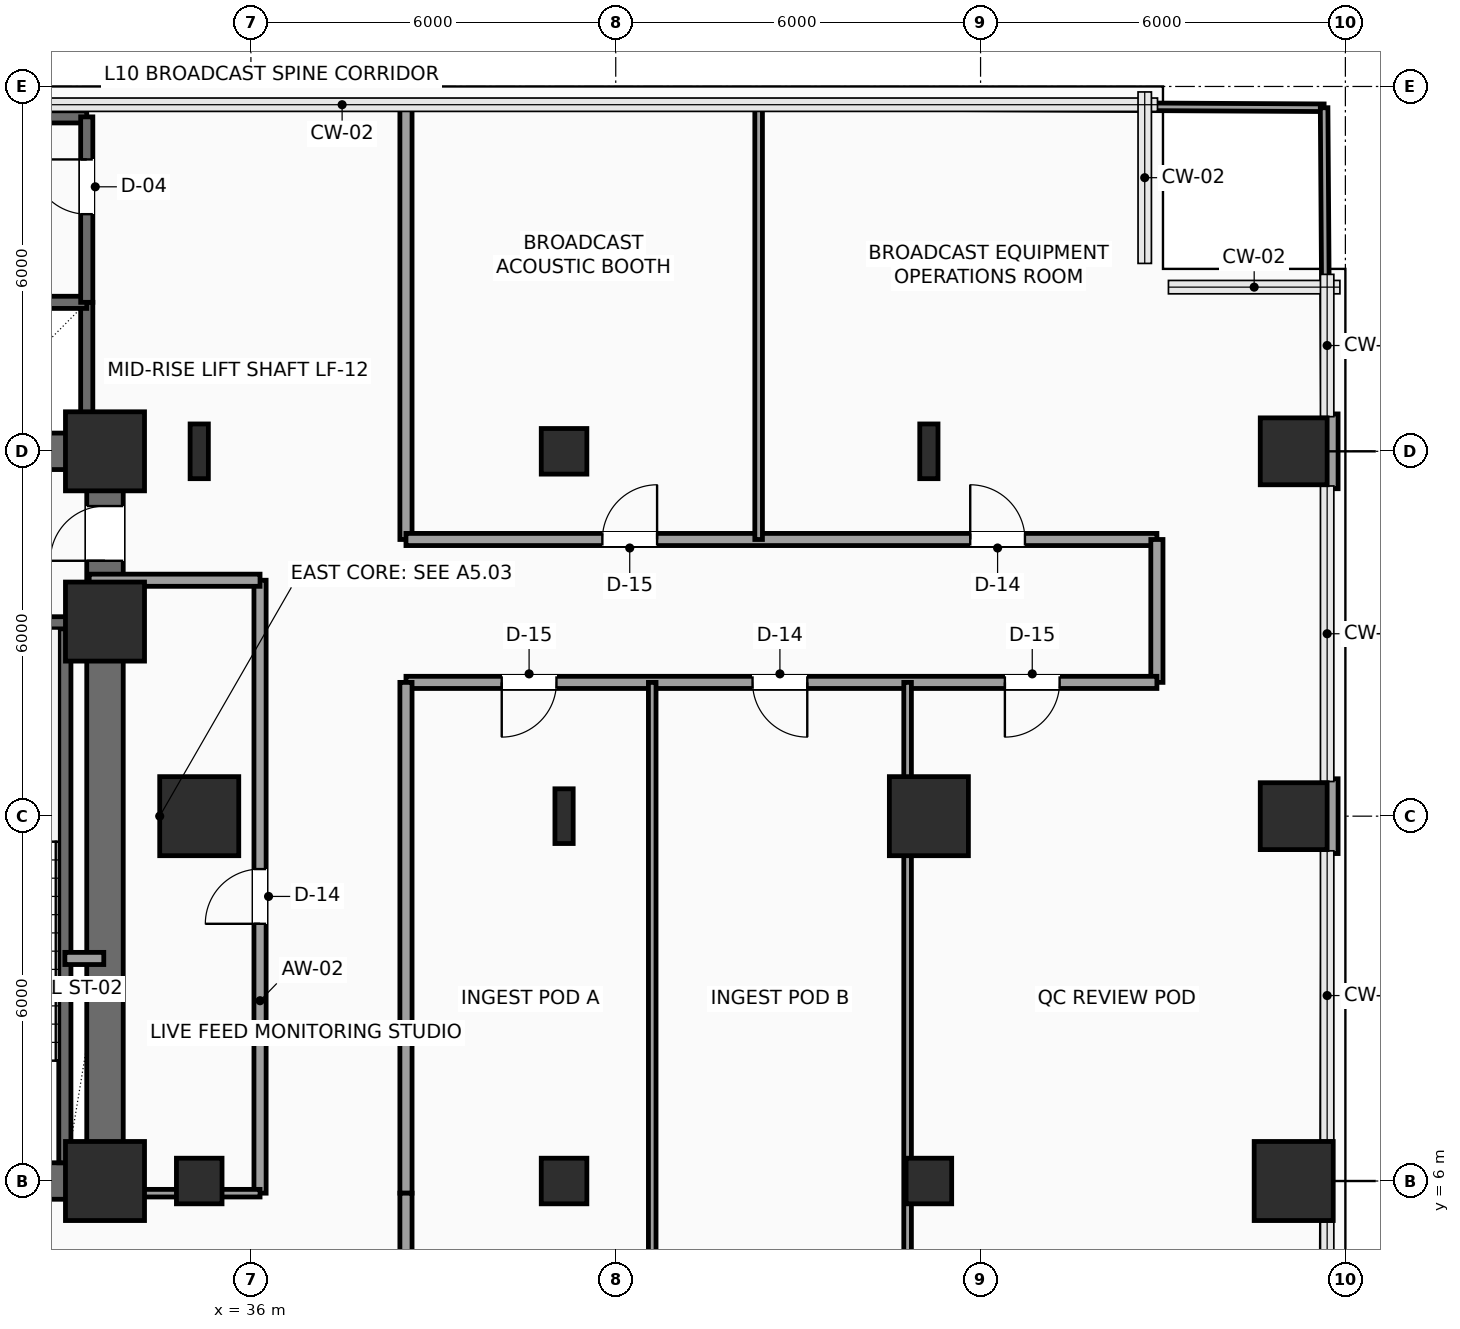
"""IFC4 building model, lengths in metres.
Left out: names, types, materials, properties, quantities, classifications, styles, units other than length and angle.
Written with IfcOpenShell. Run it as: python <this file> out.ifc"""

import sys

from ifc_helpers import new_model, si_unit, direction, frame, frame_2d, origin, origin_2d, place, context, subcontext, project, spatial, rectangle, hollow_rectangle, i_section, extrude, element, fill, save


model = new_model("IFC4")
c1 = context("Model", 3, precision=1e-05, world=origin(), true_north=direction((0.0, 1.0)))
c2 = subcontext(c1, "Body", "Model", "MODEL_VIEW")
j1 = project(units=[si_unit("LENGTHUNIT", "METRE"), si_unit("PLANEANGLEUNIT", "RADIAN")], contexts=[c1])
p1 = place(None, origin())
s1 = spatial("IfcSite", under=j1, at=p1, CompositionType="ELEMENT")
p2 = place(p1, origin())
s2 = spatial("IfcBuilding", under=s1, at=p2, CompositionType="ELEMENT")
p3 = place(p2, frame((0.0, 0.0, 48.0)))
s3 = spatial("IfcBuildingStorey", under=s2, at=p3, CompositionType="ELEMENT", Elevation=48.0)
for number, where, z_axis, x_axis in (
    (1, (33.6, 6.0, 0.0), (0.0, 0.0, 1.0), (1.0, 0.0, 0.0)),
    (2, (33.6, 15.2, 0.0), (0.0, 0.0, 1.0), (1.0, 0.0, 0.0)),
    (3, (33.6, 18.0, 0.0), (0.0, 0.0, 1.0), (1.0, 0.0, 0.0)),
):
    element("IfcColumn", number, at=place(p3, frame(where, z_axis=z_axis, x_axis=x_axis)), inside=s3, PredefinedType="COLUMN", context=c2, shape_type="SweptSolid", body=[
        extrude(rectangle(XDim=1.3, YDim=1.3, at=origin_2d()), origin(), (0.0, 0.0, 1.0), 3.9),
    ])
p4 = place(p3, frame((35.15, 6.0, 0.0), z_axis=(0.0, 0.0, 1.0), x_axis=(1.0, 0.0, 0.0)))
e4 = element("IfcColumn", 4, at=p4, inside=s3, PredefinedType="COLUMN", context=c2, shape_type="SweptSolid", body=[
    extrude(hollow_rectangle(XDim=0.75, YDim=0.75, WallThickness=0.035, InnerFilletRadius=0.035, OuterFilletRadius=0.05, at=origin_2d()), origin(), (0.0, 0.0, 1.0), 3.9),
])
p5 = place(p3, frame((35.15, 12.0, 0.0), z_axis=(0.0, 0.0, 1.0), x_axis=(1.0, 0.0, 0.0)))
e5 = element("IfcColumn", 5, at=p5, inside=s3, PredefinedType="COLUMN", context=c2, shape_type="SweptSolid", body=[
    extrude(rectangle(XDim=1.3, YDim=1.3, at=origin_2d()), origin(), (0.0, 0.0, 1.0), 3.9),
])
p6 = place(p3, frame((35.15, 18.0, 0.0), z_axis=(0.0, 0.0, 1.0), x_axis=(1.0, 0.0, 0.0)))
e6 = element("IfcColumn", 6, at=p6, inside=s3, PredefinedType="COLUMN", context=c2, shape_type="SweptSolid", body=[
    extrude(i_section(OverallWidth=0.3, OverallDepth=0.9, WebThickness=0.019, FlangeThickness=0.035, FilletRadius=0.03, at=origin_2d()), origin(), (0.0, 0.0, 1.0), 3.9),
])
p7 = place(p3, frame((41.15, 6.0, 0.0), z_axis=(0.0, 0.0, 1.0), x_axis=(1.0, 0.0, 0.0)))
e7 = element("IfcColumn", 7, at=p7, inside=s3, PredefinedType="COLUMN", context=c2, shape_type="SweptSolid", body=[
    extrude(hollow_rectangle(XDim=0.75, YDim=0.75, WallThickness=0.035, InnerFilletRadius=0.035, OuterFilletRadius=0.05, at=origin_2d()), origin(), (0.0, 0.0, 1.0), 3.9),
])
p8 = place(p3, frame((41.15, 12.0, 0.0), z_axis=(0.0, 0.0, 1.0), x_axis=(1.0, 0.0, 0.0)))
e8 = element("IfcColumn", 8, at=p8, inside=s3, PredefinedType="COLUMN", context=c2, shape_type="SweptSolid", body=[
    extrude(i_section(OverallWidth=0.3, OverallDepth=0.9, WebThickness=0.019, FlangeThickness=0.035, FilletRadius=0.03, at=origin_2d()), origin(), (0.0, 0.0, 1.0), 3.9),
])
for number, where, z_axis, x_axis in (
    (9, (41.15, 18.0, 0.0), (0.0, 0.0, 1.0), (1.0, 0.0, 0.0)),
    (10, (47.15, 6.0, 0.0), (0.0, 0.0, 1.0), (1.0, 0.0, 0.0)),
):
    element("IfcColumn", number, at=place(p3, frame(where, z_axis=z_axis, x_axis=x_axis)), inside=s3, PredefinedType="COLUMN", context=c2, shape_type="SweptSolid", body=[
        extrude(hollow_rectangle(XDim=0.75, YDim=0.75, WallThickness=0.035, InnerFilletRadius=0.035, OuterFilletRadius=0.05, at=origin_2d()), origin(), (0.0, 0.0, 1.0), 3.9),
    ])
p9 = place(p3, frame((47.15, 12.0, 0.0), z_axis=(0.0, 0.0, 1.0), x_axis=(1.0, 0.0, 0.0)))
e11 = element("IfcColumn", 11, at=p9, inside=s3, PredefinedType="COLUMN", context=c2, shape_type="SweptSolid", body=[
    extrude(rectangle(XDim=1.3, YDim=1.3, at=origin_2d()), origin(), (0.0, 0.0, 1.0), 3.9),
])
p10 = place(p3, frame((47.15, 18.0, 0.0), z_axis=(0.0, 0.0, 1.0), x_axis=(1.0, 0.0, 0.0)))
e12 = element("IfcColumn", 12, at=p10, inside=s3, PredefinedType="COLUMN", context=c2, shape_type="SweptSolid", body=[
    extrude(i_section(OverallWidth=0.3, OverallDepth=0.9, WebThickness=0.019, FlangeThickness=0.035, FilletRadius=0.03, at=origin_2d()), origin(), (0.0, 0.0, 1.0), 3.9),
])
p11 = place(p3, frame((53.15, 6.0, 0.0), z_axis=(0.0, 0.0, 1.0), x_axis=(1.0, 0.0, 0.0)))
e13 = element("IfcColumn", 13, at=p11, inside=s3, PredefinedType="COLUMN", context=c2, shape_type="SweptSolid", body=[
    extrude(rectangle(XDim=1.3, YDim=1.3, at=origin_2d()), origin(), (0.0, 0.0, 1.0), 3.9),
])
for number, where, z_axis, x_axis in (
    (14, (53.15, 12.0, 0.0), (0.0, 0.0, 1.0), (1.0, 0.0, 0.0)),
    (15, (53.15, 18.0, 0.0), (0.0, 0.0, 1.0), (1.0, 0.0, 0.0)),
):
    element("IfcColumn", number, at=place(p3, frame(where, z_axis=z_axis, x_axis=x_axis)), inside=s3, PredefinedType="COLUMN", context=c2, shape_type="SweptSolid", body=[
        extrude(rectangle(XDim=1.1, YDim=1.1, at=origin_2d()), origin(), (0.0, 0.0, 1.0), 3.9),
    ])
for number, where, z_axis, x_axis in (
    (16, (53.76, 18.615, 0.0), (0.0, 0.0, 1.0), (0.0, -1.0, 0.0)),
    (17, (53.76, 12.615, 0.0), (0.0, 0.0, 1.0), (0.0, -1.0, 0.0)),
):
    element("IfcWall", number, at=place(p3, frame(where, z_axis=z_axis, x_axis=x_axis)), inside=s3, PredefinedType="SOLIDWALL", context=c2, shape_type="SweptSolid", body=[
        extrude(rectangle(XDim=1.23, YDim=0.24, at=frame_2d((0.615, 0.0))), origin(), (0.0, 0.0, 1.0), 3.65),
    ])
for number, where, z_axis, x_axis in (
    (18, (24.0, 6.0, 0.0), (0.0, 0.0, 1.0), (1.0, 0.0, 0.0)),
    (19, (24.0, 18.0, 0.0), (0.0, 0.0, 1.0), (1.0, 0.0, 0.0)),
):
    element("IfcWall", number, at=place(p3, frame(where, z_axis=z_axis, x_axis=x_axis)), inside=s3, PredefinedType="SHEAR", context=c2, shape_type="SweptSolid", body=[
        extrude(rectangle(XDim=9.6, YDim=0.6, at=frame_2d((4.8, 0.0))), origin(), (0.0, 0.0, 1.0), 3.65),
    ])
p12 = place(p3, frame((33.6, 6.0, 0.0), z_axis=(0.0, 0.0, 1.0), x_axis=(0.0, 1.0, 0.0)))
e20 = element("IfcWall", 20, at=p12, inside=s3, PredefinedType="SHEAR", context=c2, shape_type="SweptSolid", body=[
    extrude(rectangle(XDim=12.0, YDim=0.6, at=frame_2d((6.0, 0.0))), origin(), (0.0, 0.0, 1.0), 3.65),
])
p13 = place(p12, frame((10.2, 0.0, 0.0)))
e21 = element("IfcOpeningElement", 21, at=p13, cuts=e20, PredefinedType="OPENING", context=c2, shape_type="SweptSolid", body=[
    extrude(rectangle(XDim=0.9, YDim=2.15, at=frame_2d((0.45, 1.075))), frame((0.0, 0.31, 0.0), z_axis=(0.0, -1.0, 0.0), x_axis=(1.0, 0.0, 0.0)), (0.0, 0.0, 1.0), 0.62),
])
p14 = place(p3, frame((32.94, 6.3, 0.0), z_axis=(0.0, 0.0, 1.0), x_axis=(0.0, 1.0, 0.0)))
e22 = element("IfcWall", 22, at=p14, inside=s3, PredefinedType="SHEAR", context=c2, shape_type="SweptSolid", body=[
    extrude(rectangle(XDim=8.88, YDim=0.2, at=frame_2d((4.44, 0.0))), origin(), (0.0, 0.0, 1.0), 3.65),
])
p15 = place(p3, frame((29.26, 15.18, 0.0), z_axis=(0.0, 0.0, 1.0), x_axis=(1.0, 0.0, 0.0)))
e23 = element("IfcWall", 23, at=p15, inside=s3, PredefinedType="SHEAR", context=c2, shape_type="SweptSolid", body=[
    extrude(rectangle(XDim=4.04, YDim=0.2, at=frame_2d((2.02, 0.0))), origin(), (0.0, 0.0, 1.0), 3.65),
])
p16 = place(p3, frame((32.94, 9.66, 0.0), z_axis=(0.0, 0.0, 1.0), x_axis=(1.0, 0.0, 0.0)))
e24 = element("IfcWall", 24, at=p16, inside=s3, PredefinedType="SOLIDWALL", context=c2, shape_type="SweptSolid", body=[
    extrude(rectangle(XDim=0.64, YDim=0.2, at=frame_2d((0.32, 0.0))), origin(), (0.0, 0.0, 1.0), 3.65),
])
p17 = place(p3, frame((33.3, 18.1, 0.0), z_axis=(0.0, 0.0, 1.0), x_axis=(0.0, 1.0, 0.0)))
e25 = element("IfcWall", 25, at=p17, inside=s3, PredefinedType="SHEAR", context=c2, shape_type="SweptSolid", body=[
    extrude(rectangle(XDim=2.35, YDim=0.2, at=frame_2d((1.175, 0.0))), origin(), (0.0, 0.0, 1.0), 3.65),
])
p18 = place(p3, frame((24.25, 20.45, 0.0), z_axis=(0.0, 0.0, 1.0), x_axis=(1.0, 0.0, 0.0)))
e26 = element("IfcWall", 26, at=p18, inside=s3, PredefinedType="SHEAR", context=c2, shape_type="SweptSolid", body=[
    extrude(rectangle(XDim=9.05, YDim=0.2, at=frame_2d((4.525, 0.0))), origin(), (0.0, 0.0, 1.0), 3.65),
])
p19 = place(p3, frame((24.15, 23.5, 0.0), z_axis=(0.0, 0.0, 1.0), x_axis=(1.0, 0.0, 0.0)))
e27 = element("IfcWall", 27, at=p19, inside=s3, PredefinedType="SHEAR", context=c2, shape_type="SweptSolid", body=[
    extrude(rectangle(XDim=9.15, YDim=0.2, at=frame_2d((4.575, 0.0))), origin(), (0.0, 0.0, 1.0), 3.65),
])
p20 = place(p3, frame((33.3, 20.45, 0.0), z_axis=(0.0, 0.0, 1.0), x_axis=(0.0, 1.0, 0.0)))
e28 = element("IfcWall", 28, at=p20, inside=s3, PredefinedType="SHEAR", context=c2, shape_type="SweptSolid", body=[
    extrude(rectangle(XDim=3.05, YDim=0.2, at=frame_2d((1.525, 0.0))), origin(), (0.0, 0.0, 1.0), 3.65),
])
p21 = place(p20, frame((1.45, 0.0, 0.0)))
e29 = element("IfcOpeningElement", 29, at=p21, cuts=e28, PredefinedType="OPENING", context=c2, shape_type="SweptSolid", body=[
    extrude(rectangle(XDim=0.9, YDim=2.15, at=frame_2d((0.45, 1.075))), frame((0.0, 0.11, 0.0), z_axis=(0.0, -1.0, 0.0), x_axis=(1.0, 0.0, 0.0)), (0.0, 0.0, 1.0), 0.22),
])
p22 = place(p3, frame((36.15, 5.8, 0.0), z_axis=(0.0, 0.0, 1.0), x_axis=(0.0, 1.0, 0.0)))
e30 = element("IfcWall", 30, at=p22, inside=s3, PredefinedType="PARTITIONING", context=c2, shape_type="SweptSolid", body=[
    extrude(rectangle(XDim=10.08, YDim=0.2, at=frame_2d((5.04, 0.0))), origin(), (0.0, 0.0, 1.0), 3.65),
])
p23 = place(p22, frame((4.43, 0.0, 0.0)))
e31 = element("IfcOpeningElement", 31, at=p23, cuts=e30, PredefinedType="OPENING", context=c2, shape_type="SweptSolid", body=[
    extrude(rectangle(XDim=0.9, YDim=2.1, at=frame_2d((0.45, 1.05))), frame((0.0, 0.11, 0.0), z_axis=(0.0, -1.0, 0.0), x_axis=(1.0, 0.0, 0.0)), (0.0, 0.0, 1.0), 0.22),
])
p24 = place(p3, frame((36.15, 15.88, 0.0), z_axis=(0.0, 0.0, 1.0), x_axis=(-1.0, 0.0, 0.0)))
e32 = element("IfcWall", 32, at=p24, inside=s3, PredefinedType="PARTITIONING", context=c2, shape_type="SweptSolid", body=[
    extrude(rectangle(XDim=2.81, YDim=0.2, at=frame_2d((1.405, 0.0))), origin(), (0.0, 0.0, 1.0), 3.65),
])
p25 = place(p3, frame((38.55, 23.7, 0.0), z_axis=(0.0, 0.0, 1.0), x_axis=(0.0, -1.0, 0.0)))
e33 = element("IfcWall", 33, at=p25, inside=s3, PredefinedType="PARTITIONING", context=c2, shape_type="SweptSolid", body=[
    extrude(rectangle(XDim=7.15, YDim=0.2, at=frame_2d((3.575, 0.0))), origin(), (0.0, 0.0, 1.0), 3.65),
])
p26 = place(p3, frame((38.55, 16.55, 0.0), z_axis=(0.0, 0.0, 1.0), x_axis=(1.0, 0.0, 0.0)))
e34 = element("IfcWall", 34, at=p26, inside=s3, PredefinedType="PARTITIONING", context=c2, shape_type="SweptSolid", body=[
    extrude(rectangle(XDim=12.35, YDim=0.2, at=frame_2d((6.175, 0.0))), origin(), (0.0, 0.0, 1.0), 3.65),
])
p27 = place(p26, frame((3.23, 0.0, 0.0)))
e35 = element("IfcOpeningElement", 35, at=p27, cuts=e34, PredefinedType="OPENING", context=c2, shape_type="SweptSolid", body=[
    extrude(rectangle(XDim=0.9, YDim=2.1, at=frame_2d((0.45, 1.05))), frame((0.0, 0.11, 0.0), z_axis=(0.0, -1.0, 0.0), x_axis=(1.0, 0.0, 0.0)), (0.0, 0.0, 1.0), 0.22),
])
p28 = place(p26, frame((9.28, 0.0, 0.0)))
e36 = element("IfcOpeningElement", 36, at=p28, cuts=e34, PredefinedType="OPENING", context=c2, shape_type="SweptSolid", body=[
    extrude(rectangle(XDim=0.9, YDim=2.1, at=frame_2d((0.45, 1.05))), frame((0.0, 0.11, 0.0), z_axis=(0.0, -1.0, 0.0), x_axis=(1.0, 0.0, 0.0)), (0.0, 0.0, 1.0), 0.22),
])
p29 = place(p3, frame((50.9, 16.55, 0.0), z_axis=(0.0, 0.0, 1.0), x_axis=(0.0, -1.0, 0.0)))
e37 = element("IfcWall", 37, at=p29, inside=s3, PredefinedType="PARTITIONING", context=c2, shape_type="SweptSolid", body=[
    extrude(rectangle(XDim=2.35, YDim=0.2, at=frame_2d((1.175, 0.0))), origin(), (0.0, 0.0, 1.0), 3.65),
])
p30 = place(p3, frame((50.9, 14.2, 0.0), z_axis=(0.0, 0.0, 1.0), x_axis=(-1.0, 0.0, 0.0)))
e38 = element("IfcWall", 38, at=p30, inside=s3, PredefinedType="PARTITIONING", context=c2, shape_type="SweptSolid", body=[
    extrude(rectangle(XDim=12.35, YDim=0.2, at=frame_2d((6.175, 0.0))), origin(), (0.0, 0.0, 1.0), 3.65),
])
p31 = place(p30, frame((9.875, 0.0, 0.0)))
e39 = element("IfcOpeningElement", 39, at=p31, cuts=e38, PredefinedType="OPENING", context=c2, shape_type="SweptSolid", body=[
    extrude(rectangle(XDim=0.9, YDim=2.1, at=frame_2d((0.45, 1.05))), frame((0.0, 0.11, 0.0), z_axis=(0.0, -1.0, 0.0), x_axis=(1.0, 0.0, 0.0)), (0.0, 0.0, 1.0), 0.22),
])
p32 = place(p30, frame((5.75, 0.0, 0.0)))
e40 = element("IfcOpeningElement", 40, at=p32, cuts=e38, PredefinedType="OPENING", context=c2, shape_type="SweptSolid", body=[
    extrude(rectangle(XDim=0.9, YDim=2.1, at=frame_2d((0.45, 1.05))), frame((0.0, 0.11, 0.0), z_axis=(0.0, -1.0, 0.0), x_axis=(1.0, 0.0, 0.0)), (0.0, 0.0, 1.0), 0.22),
])
p33 = place(p30, frame((1.6, 0.0, 0.0)))
e41 = element("IfcOpeningElement", 41, at=p33, cuts=e38, PredefinedType="OPENING", context=c2, shape_type="SweptSolid", body=[
    extrude(rectangle(XDim=0.9, YDim=2.1, at=frame_2d((0.45, 1.05))), frame((0.0, 0.11, 0.0), z_axis=(0.0, -1.0, 0.0), x_axis=(1.0, 0.0, 0.0)), (0.0, 0.0, 1.0), 0.22),
])
p34 = place(p3, frame((38.55, 14.2, 0.0), z_axis=(0.0, 0.0, 1.0), x_axis=(0.0, -1.0, 0.0)))
e42 = element("IfcWall", 42, at=p34, inside=s3, PredefinedType="PARTITIONING", context=c2, shape_type="SweptSolid", body=[
    extrude(rectangle(XDim=8.4, YDim=0.2, at=frame_2d((4.2, 0.0))), origin(), (0.0, 0.0, 1.0), 3.65),
])
p35 = place(p3, frame((38.55, 5.8, 0.0), z_axis=(0.0, 0.0, 1.0), x_axis=(0.0, -1.0, 0.0)))
e43 = element("IfcWall", 43, at=p35, inside=s3, PredefinedType="PARTITIONING", context=c2, shape_type="SweptSolid", body=[
    extrude(rectangle(XDim=2.35, YDim=0.2, at=frame_2d((1.175, 0.0))), origin(), (0.0, 0.0, 1.0), 3.65),
])
for number, where, z_axis, x_axis in (
    (44, (42.6, 0.3, 0.0), (0.0, 0.0, 1.0), (0.0, 1.0, 0.0)),
    (45, (46.8, 0.3, 0.0), (0.0, 0.0, 1.0), (0.0, 1.0, 0.0)),
):
    element("IfcWall", number, at=place(p3, frame(where, z_axis=z_axis, x_axis=x_axis)), inside=s3, PredefinedType="PARTITIONING", context=c2, shape_type="SweptSolid", body=[
        extrude(rectangle(XDim=13.9, YDim=0.125, at=frame_2d((6.95, 0.0))), origin(), (0.0, 0.0, 1.0), 3.65),
    ])
p36 = place(p3, frame((53.65, 0.35, 0.0), z_axis=(0.0, 0.0, 1.0), x_axis=(0.003606251025, 0.999993497456, 0.0)))
e46 = element("IfcWall", 46, at=p36, inside=s3, PredefinedType="PARTITIONING", context=c2, shape_type="SweptSolid", body=[
    extrude(rectangle(XDim=11.035, YDim=0.125, at=frame_2d((5.518, 0.0))), origin(), (0.0, 0.0, 1.0), 3.65),
])
p37 = place(p3, frame((53.694, 12.615, 0.0), z_axis=(0.0, 0.0, 1.0), x_axis=(0.003542799701, 0.999993724265, 0.0)))
e47 = element("IfcWall", 47, at=p37, inside=s3, PredefinedType="PARTITIONING", context=c2, shape_type="SweptSolid", body=[
    extrude(rectangle(XDim=1.585, YDim=0.125, at=frame_2d((0.792, 0.0))), origin(), (0.0, 0.0, 1.0), 3.65),
])
p38 = place(p3, frame((44.35, 16.55, 0.0), z_axis=(0.0, 0.0, 1.0), x_axis=(0.0, 1.0, 0.0)))
e48 = element("IfcWall", 48, at=p38, inside=s3, PredefinedType="PARTITIONING", context=c2, shape_type="SweptSolid", body=[
    extrude(rectangle(XDim=7.15, YDim=0.125, at=frame_2d((3.575, 0.0))), origin(), (0.0, 0.0, 1.0), 3.65),
])
p39 = place(p3, frame((44.35, 23.7, 0.0), z_axis=(0.0, 0.0, 1.0), x_axis=(0.999985518927, -0.005381629512, 0.0)))
e49 = element("IfcWall", 49, at=p39, inside=s3, PredefinedType="PARTITIONING", context=c2, shape_type="SweptSolid", body=[
    extrude(rectangle(XDim=9.3, YDim=0.125, at=frame_2d((4.65, 0.0))), origin(), (0.0, 0.0, 1.0), 3.65),
])
p40 = place(p3, frame((53.7, 16.55, 0.0), z_axis=(0.0, 0.0, 1.0), x_axis=(-0.007017371073, 0.999975377948, 0.0)))
e50 = element("IfcWall", 50, at=p40, inside=s3, PredefinedType="PARTITIONING", context=c2, shape_type="SweptSolid", body=[
    extrude(rectangle(XDim=0.835, YDim=0.125, at=frame_2d((0.417, 0.0))), origin(), (0.0, 0.0, 1.0), 3.65),
])
p41 = place(p3, frame((53.686, 18.615, 0.0), z_axis=(0.0, 0.0, 1.0), x_axis=(-0.007079296972, 0.999974941463, 0.0)))
e51 = element("IfcWall", 51, at=p41, inside=s3, PredefinedType="PARTITIONING", context=c2, shape_type="SweptSolid", body=[
    extrude(rectangle(XDim=5.035, YDim=0.125, at=frame_2d((2.518, 0.0))), origin(), (0.0, 0.0, 1.0), 3.65),
])
p42 = place(p3, frame((33.65, 5.8, 0.0), z_axis=(0.0, 0.0, 1.0), x_axis=(1.0, 0.0, 0.0)))
e52 = element("IfcWall", 52, at=p42, inside=s3, PredefinedType="PARTITIONING", context=c2, shape_type="SweptSolid", body=[
    extrude(rectangle(XDim=2.5, YDim=0.125, at=frame_2d((1.25, 0.0))), origin(), (0.0, 0.0, 1.0), 2.992),
])
p43 = place(p13, origin())
e53 = element("IfcDoor", 53, at=p43, inside=s3, OperationType="SINGLE_SWING_LEFT", PredefinedType="DOOR", context=c2, shape_type="SweptSolid", body=[
    extrude(rectangle(XDim=0.9, YDim=2.15, at=frame_2d((0.45, 1.075))), frame((0.0, 0.025, 0.0), z_axis=(0.0, -1.0, 0.0), x_axis=(1.0, 0.0, 0.0)), (0.0, 0.0, 1.0), 0.05),
])
fill(e21, e53)
p44 = place(p21, origin())
e54 = element("IfcDoor", 54, at=p44, inside=s3, OperationType="SINGLE_SWING_RIGHT", PredefinedType="DOOR", context=c2, shape_type="SweptSolid", body=[
    extrude(rectangle(XDim=0.9, YDim=2.15, at=frame_2d((0.45, 1.075))), frame((0.0, 0.025, 0.0), z_axis=(0.0, -1.0, 0.0), x_axis=(1.0, 0.0, 0.0)), (0.0, 0.0, 1.0), 0.05),
])
fill(e29, e54)
p45 = place(p23, origin())
e55 = element("IfcDoor", 55, at=p45, inside=s3, OperationType="SINGLE_SWING_LEFT", PredefinedType="DOOR", context=c2, shape_type="SweptSolid", body=[
    extrude(rectangle(XDim=0.9, YDim=2.1, at=frame_2d((0.45, 1.05))), frame((0.0, 0.025, 0.0), z_axis=(0.0, -1.0, 0.0), x_axis=(1.0, 0.0, 0.0)), (0.0, 0.0, 1.0), 0.05),
])
fill(e31, e55)
p46 = place(p27, origin())
e56 = element("IfcDoor", 56, at=p46, inside=s3, OperationType="SINGLE_SWING_RIGHT", PredefinedType="DOOR", context=c2, shape_type="SweptSolid", body=[
    extrude(rectangle(XDim=0.9, YDim=2.1, at=frame_2d((0.45, 1.05))), frame((0.0, 0.025, 0.0), z_axis=(0.0, -1.0, 0.0), x_axis=(1.0, 0.0, 0.0)), (0.0, 0.0, 1.0), 0.05),
])
fill(e35, e56)
p47 = place(p28, origin())
e57 = element("IfcDoor", 57, at=p47, inside=s3, OperationType="SINGLE_SWING_LEFT", PredefinedType="DOOR", context=c2, shape_type="SweptSolid", body=[
    extrude(rectangle(XDim=0.9, YDim=2.1, at=frame_2d((0.45, 1.05))), frame((0.0, 0.025, 0.0), z_axis=(0.0, -1.0, 0.0), x_axis=(1.0, 0.0, 0.0)), (0.0, 0.0, 1.0), 0.05),
])
fill(e36, e57)
p48 = place(p31, origin())
e58 = element("IfcDoor", 58, at=p48, inside=s3, OperationType="SINGLE_SWING_RIGHT", PredefinedType="DOOR", context=c2, shape_type="SweptSolid", body=[
    extrude(rectangle(XDim=0.9, YDim=2.1, at=frame_2d((0.45, 1.05))), frame((0.0, 0.025, 0.0), z_axis=(0.0, -1.0, 0.0), x_axis=(1.0, 0.0, 0.0)), (0.0, 0.0, 1.0), 0.05),
])
fill(e39, e58)
p49 = place(p32, origin())
e59 = element("IfcDoor", 59, at=p49, inside=s3, OperationType="SINGLE_SWING_LEFT", PredefinedType="DOOR", context=c2, shape_type="SweptSolid", body=[
    extrude(rectangle(XDim=0.9, YDim=2.1, at=frame_2d((0.45, 1.05))), frame((0.0, 0.025, 0.0), z_axis=(0.0, -1.0, 0.0), x_axis=(1.0, 0.0, 0.0)), (0.0, 0.0, 1.0), 0.05),
])
fill(e40, e59)
p50 = place(p33, origin())
e60 = element("IfcDoor", 60, at=p50, inside=s3, OperationType="SINGLE_SWING_RIGHT", PredefinedType="DOOR", context=c2, shape_type="SweptSolid", body=[
    extrude(rectangle(XDim=0.9, YDim=2.1, at=frame_2d((0.45, 1.05))), frame((0.0, 0.025, 0.0), z_axis=(0.0, -1.0, 0.0), x_axis=(1.0, 0.0, 0.0)), (0.0, 0.0, 1.0), 0.05),
])
fill(e41, e60)
save(model, sys.argv[1])
